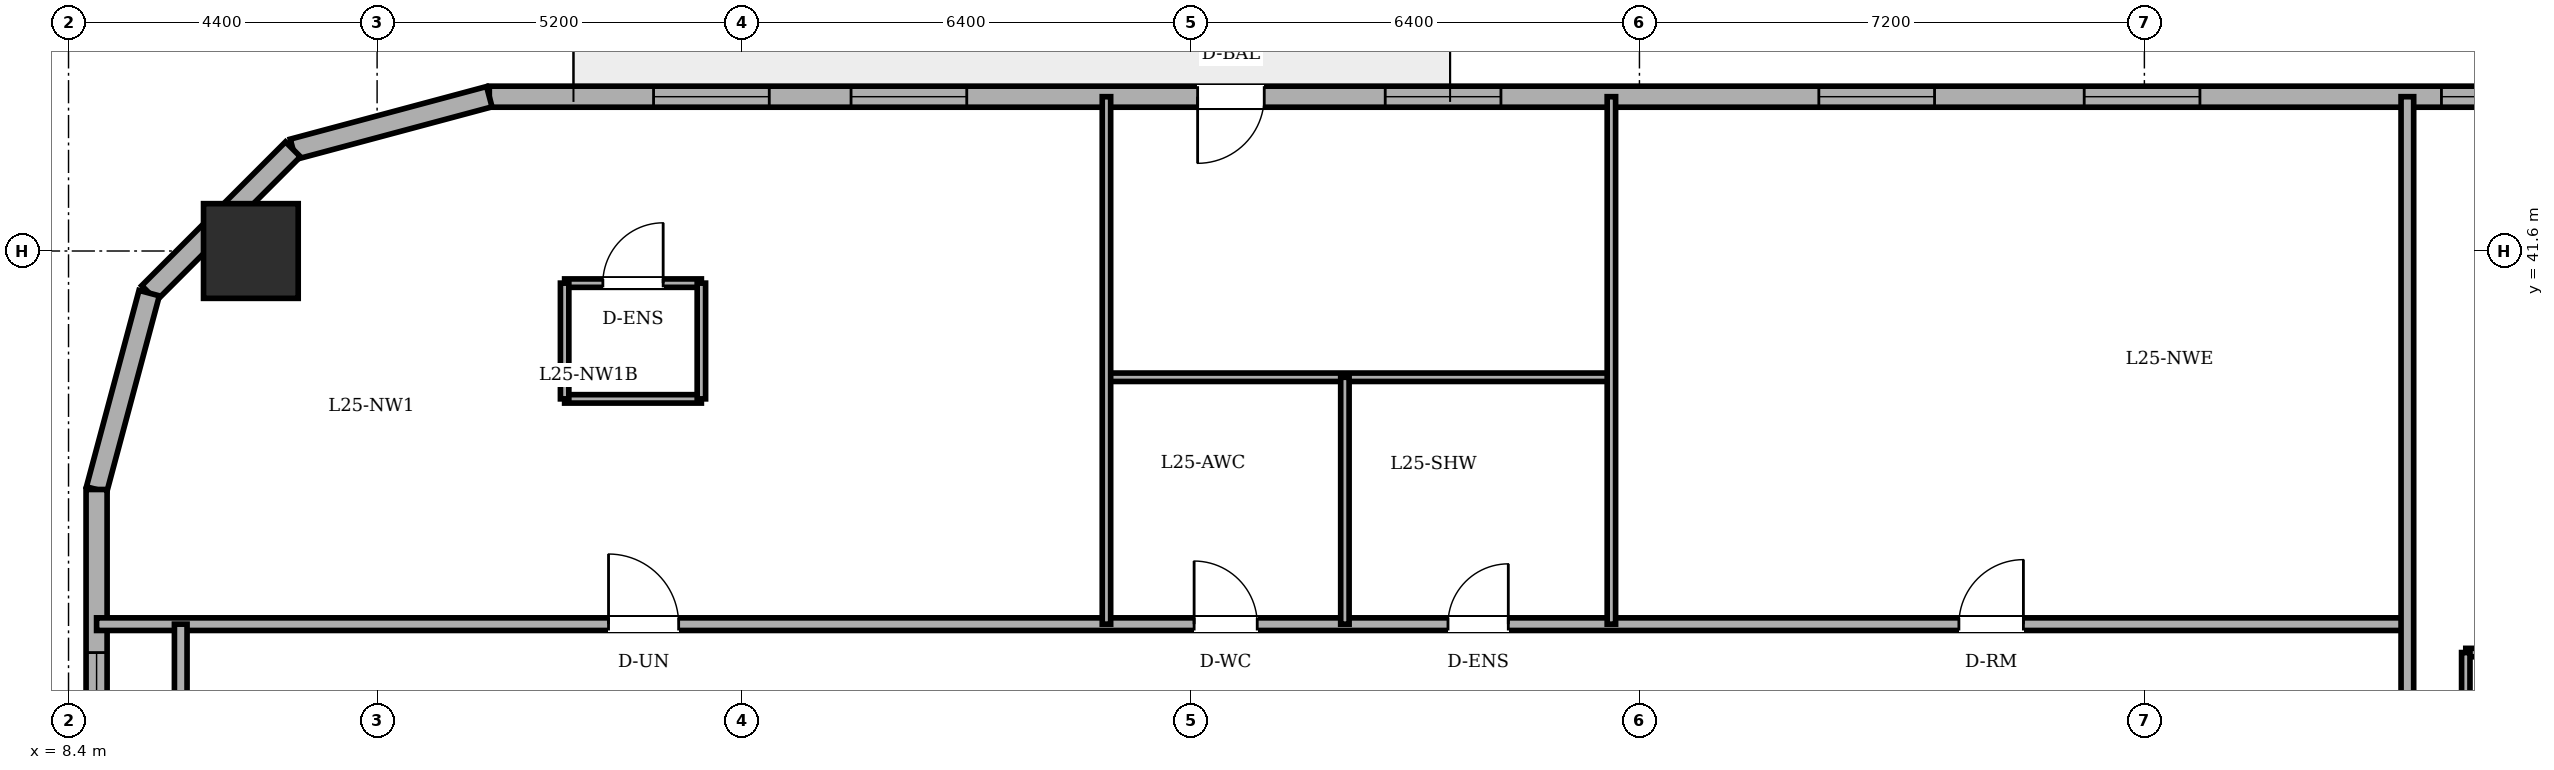
"""IFC4 building model, lengths in metres.
Left out: names, types, materials, properties, quantities, classifications, styles, units other than length and angle.
Written with IfcOpenShell. Run it as: python <this file> out.ifc"""

import sys

from ifc_helpers import new_model, si_unit, direction, frame, frame_2d, origin, origin_2d, place, context, subcontext, project, spatial, rectangle, circle, extrude, element, fill, save


model = new_model("IFC4")
c1 = context("Model", 3, precision=1e-05, world=origin(), true_north=direction((0.0, 1.0)))
c2 = subcontext(c1, "Body", "Model", "MODEL_VIEW")
j1 = project(units=[si_unit("LENGTHUNIT", "METRE"), si_unit("PLANEANGLEUNIT", "RADIAN")], contexts=[c1])
p1 = place(None, origin())
s1 = spatial("IfcSite", under=j1, at=p1, CompositionType="ELEMENT")
p2 = place(p1, origin())
s2 = spatial("IfcBuilding", under=s1, at=p2, CompositionType="ELEMENT")
p3 = place(p2, frame((0.0, 0.0, 97.1)))
s3 = spatial("IfcBuildingStorey", under=s2, at=p3, CompositionType="ELEMENT", Elevation=97.1)
p4 = place(p3, frame((11.0, 41.6, 0.0), z_axis=(0.0, 0.0, 1.0), x_axis=(1.0, 0.0, 0.0)))
e1 = element("IfcColumn", 1, at=p4, inside=s3, PredefinedType="COLUMN", context=c2, shape_type="SweptSolid", body=[
    extrude(circle(Radius=0.675, at=origin_2d()), origin(), (0.0, 0.0, 1.0), 3.6),
])
p5 = place(p3, frame((44.333, 43.8, 0.0), z_axis=(0.0, 0.0, 1.0), x_axis=(-1.0, 0.0, 0.0)))
e2 = element("IfcWall", 2, at=p5, inside=s3, PredefinedType="SOLIDWALL", context=c2, shape_type="SweptSolid", body=[
    extrude(rectangle(XDim=29.933, YDim=0.3, at=frame_2d((14.967, 0.0))), origin(), (0.0, 0.0, 1.0), 3.4),
])
p6 = place(p5, frame((18.883, 0.0, 0.0)))
e3 = element("IfcOpeningElement", 3, at=p6, cuts=e2, PredefinedType="OPENING", context=c2, shape_type="SweptSolid", body=[
    extrude(rectangle(XDim=0.95, YDim=2.2, at=frame_2d((0.475, 1.1))), frame((0.0, 0.16, 0.0), z_axis=(0.0, -1.0, 0.0), x_axis=(1.0, 0.0, 0.0)), (0.0, 0.0, 1.0), 0.32),
])
p7 = place(p5, frame((5.541, 0.0, 0.85)))
e4 = element("IfcOpeningElement", 4, at=p7, cuts=e2, PredefinedType="OPENING", context=c2, shape_type="SweptSolid", body=[
    extrude(rectangle(XDim=1.65, YDim=1.55, at=frame_2d((0.825, 0.775))), frame((0.0, 0.16, 0.0), z_axis=(0.0, -1.0, 0.0), x_axis=(1.0, 0.0, 0.0)), (0.0, 0.0, 1.0), 0.32),
])
p8 = place(p5, frame((9.325, 0.0, 0.85)))
e5 = element("IfcOpeningElement", 5, at=p8, cuts=e2, PredefinedType="OPENING", context=c2, shape_type="SweptSolid", body=[
    extrude(rectangle(XDim=1.65, YDim=1.55, at=frame_2d((0.825, 0.775))), frame((0.0, 0.16, 0.0), z_axis=(0.0, -1.0, 0.0), x_axis=(1.0, 0.0, 0.0)), (0.0, 0.0, 1.0), 0.32),
])
p9 = place(p5, frame((15.508, 0.0, 0.85)))
e6 = element("IfcOpeningElement", 6, at=p9, cuts=e2, PredefinedType="OPENING", context=c2, shape_type="SweptSolid", body=[
    extrude(rectangle(XDim=1.65, YDim=1.55, at=frame_2d((0.825, 0.775))), frame((0.0, 0.16, 0.0), z_axis=(0.0, -1.0, 0.0), x_axis=(1.0, 0.0, 0.0)), (0.0, 0.0, 1.0), 0.32),
])
p10 = place(p5, frame((23.125, 0.0, 0.85)))
e7 = element("IfcOpeningElement", 7, at=p10, cuts=e2, PredefinedType="OPENING", context=c2, shape_type="SweptSolid", body=[
    extrude(rectangle(XDim=1.65, YDim=1.55, at=frame_2d((0.825, 0.775))), frame((0.0, 0.16, 0.0), z_axis=(0.0, -1.0, 0.0), x_axis=(1.0, 0.0, 0.0)), (0.0, 0.0, 1.0), 0.32),
])
p11 = place(p5, frame((25.941, 0.0, 0.85)))
e8 = element("IfcOpeningElement", 8, at=p11, cuts=e2, PredefinedType="OPENING", context=c2, shape_type="SweptSolid", body=[
    extrude(rectangle(XDim=1.65, YDim=1.55, at=frame_2d((0.825, 0.775))), frame((0.0, 0.16, 0.0), z_axis=(0.0, -1.0, 0.0), x_axis=(1.0, 0.0, 0.0)), (0.0, 0.0, 1.0), 0.32),
])
p12 = place(p5, frame((1.047, 0.0, 0.85)))
e9 = element("IfcOpeningElement", 9, at=p12, cuts=e2, PredefinedType="OPENING", context=c2, shape_type="SweptSolid", body=[
    extrude(rectangle(XDim=1.05, YDim=1.55, at=frame_2d((0.525, 0.775))), frame((0.0, 0.16, 0.0), z_axis=(0.0, -1.0, 0.0), x_axis=(1.0, 0.0, 0.0)), (0.0, 0.0, 1.0), 0.32),
])
p13 = place(p3, frame((14.4, 43.8, 0.0), z_axis=(0.0, 0.0, 1.0), x_axis=(-0.965943540406, -0.258752926066, 0.0)))
e10 = element("IfcWall", 10, at=p13, inside=s3, PredefinedType="SOLIDWALL", context=c2, shape_type="SweptSolid", body=[
    extrude(rectangle(XDim=2.898, YDim=0.3, at=frame_2d((1.449, 0.0))), origin(), (0.0, 0.0, 1.0), 3.4),
])
p14 = place(p3, frame((11.6, 43.05, 0.0), z_axis=(0.0, 0.0, 1.0), x_axis=(-0.707106781187, -0.707106781187, 0.0)))
e11 = element("IfcWall", 11, at=p14, inside=s3, PredefinedType="SOLIDWALL", context=c2, shape_type="SweptSolid", body=[
    extrude(rectangle(XDim=2.899, YDim=0.3, at=frame_2d((1.45, 0.0))), origin(), (0.0, 0.0, 1.0), 3.4),
])
p15 = place(p3, frame((9.55, 41.0, 0.0), z_axis=(0.0, 0.0, 1.0), x_axis=(-0.258731875344, -0.96594917914, 0.0)))
e12 = element("IfcWall", 12, at=p15, inside=s3, PredefinedType="SOLIDWALL", context=c2, shape_type="SweptSolid", body=[
    extrude(rectangle(XDim=2.899, YDim=0.3, at=frame_2d((1.449, 0.0))), origin(), (0.0, 0.0, 1.0), 3.4),
])
p16 = place(p3, frame((8.8, 38.2, 0.0), z_axis=(0.0, 0.0, 1.0), x_axis=(0.0, -1.0, 0.0)))
e13 = element("IfcWall", 13, at=p16, inside=s3, PredefinedType="SOLIDWALL", context=c2, shape_type="SweptSolid", body=[
    extrude(rectangle(XDim=28.4, YDim=0.3, at=frame_2d((14.2, 0.0))), origin(), (0.0, 0.0, 1.0), 3.4),
])
p17 = place(p16, frame((2.325, 0.0, 0.85)))
e14 = element("IfcOpeningElement", 14, at=p17, cuts=e13, PredefinedType="OPENING", context=c2, shape_type="SweptSolid", body=[
    extrude(rectangle(XDim=1.65, YDim=1.55, at=frame_2d((0.825, 0.775))), frame((0.0, 0.16, 0.0), z_axis=(0.0, -1.0, 0.0), x_axis=(1.0, 0.0, 0.0)), (0.0, 0.0, 1.0), 0.32),
])
p18 = place(p16, frame((7.328, 0.0, 0.85)))
e15 = element("IfcOpeningElement", 15, at=p18, cuts=e13, PredefinedType="OPENING", context=c2, shape_type="SweptSolid", body=[
    extrude(rectangle(XDim=1.65, YDim=1.55, at=frame_2d((0.825, 0.775))), frame((0.0, 0.16, 0.0), z_axis=(0.0, -1.0, 0.0), x_axis=(1.0, 0.0, 0.0)), (0.0, 0.0, 1.0), 0.32),
])
p19 = place(p16, frame((11.102, 0.0, 0.85)))
e16 = element("IfcOpeningElement", 16, at=p19, cuts=e13, PredefinedType="OPENING", context=c2, shape_type="SweptSolid", body=[
    extrude(rectangle(XDim=1.65, YDim=1.55, at=frame_2d((0.825, 0.775))), frame((0.0, 0.16, 0.0), z_axis=(0.0, -1.0, 0.0), x_axis=(1.0, 0.0, 0.0)), (0.0, 0.0, 1.0), 0.32),
])
p20 = place(p16, frame((17.648, 0.0, 0.85)))
e17 = element("IfcOpeningElement", 17, at=p20, cuts=e13, PredefinedType="OPENING", context=c2, shape_type="SweptSolid", body=[
    extrude(rectangle(XDim=1.65, YDim=1.55, at=frame_2d((0.825, 0.775))), frame((0.0, 0.16, 0.0), z_axis=(0.0, -1.0, 0.0), x_axis=(1.0, 0.0, 0.0)), (0.0, 0.0, 1.0), 0.32),
])
p21 = place(p16, frame((20.422, 0.0, 0.85)))
e18 = element("IfcOpeningElement", 18, at=p21, cuts=e13, PredefinedType="OPENING", context=c2, shape_type="SweptSolid", body=[
    extrude(rectangle(XDim=1.65, YDim=1.55, at=frame_2d((0.825, 0.775))), frame((0.0, 0.16, 0.0), z_axis=(0.0, -1.0, 0.0), x_axis=(1.0, 0.0, 0.0)), (0.0, 0.0, 1.0), 0.32),
])
p22 = place(p16, frame((24.425, 0.0, 0.85)))
e19 = element("IfcOpeningElement", 19, at=p22, cuts=e13, PredefinedType="OPENING", context=c2, shape_type="SweptSolid", body=[
    extrude(rectangle(XDim=1.65, YDim=1.55, at=frame_2d((0.825, 0.775))), frame((0.0, 0.16, 0.0), z_axis=(0.0, -1.0, 0.0), x_axis=(1.0, 0.0, 0.0)), (0.0, 0.0, 1.0), 0.32),
])
p23 = place(p3, frame((42.583, 35.875, 0.0), z_axis=(0.0, 0.0, 1.0), x_axis=(1.0, 0.0, 0.0)))
e20 = element("IfcWall", 20, at=p23, inside=s3, PredefinedType="PARTITIONING", context=c2, shape_type="SweptSolid", body=[
    extrude(rectangle(XDim=1.95, YDim=0.12, at=frame_2d((0.975, 0.0))), origin(), (0.0, 0.0, 1.0), 3.4),
])
p24 = place(p23, frame((0.545, 0.0, 0.0)))
e21 = element("IfcOpeningElement", 21, at=p24, cuts=e20, PredefinedType="OPENING", context=c2, shape_type="SweptSolid", body=[
    extrude(rectangle(XDim=0.86, YDim=2.1, at=frame_2d((0.43, 1.05))), frame((0.0, 0.07, 0.0), z_axis=(0.0, -1.0, 0.0), x_axis=(1.0, 0.0, 0.0)), (0.0, 0.0, 1.0), 0.14),
])
p25 = place(p3, frame((42.583, 35.875, 0.0), z_axis=(0.0, 0.0, 1.0), x_axis=(0.0, -1.0, 0.0)))
e22 = element("IfcWall", 22, at=p25, inside=s3, PredefinedType="PARTITIONING", context=c2, shape_type="SweptSolid", body=[
    extrude(rectangle(XDim=1.65, YDim=0.12, at=frame_2d((0.825, 0.0))), origin(), (0.0, 0.0, 1.0), 3.4),
])
p26 = place(p3, frame((15.474, 41.142, 0.0), z_axis=(0.0, 0.0, 1.0), x_axis=(1.0, 0.0, 0.0)))
e23 = element("IfcWall", 23, at=p26, inside=s3, PredefinedType="PARTITIONING", context=c2, shape_type="SweptSolid", body=[
    extrude(rectangle(XDim=1.95, YDim=0.12, at=frame_2d((0.975, 0.0))), origin(), (0.0, 0.0, 1.0), 3.4),
])
p27 = place(p26, frame((0.545, 0.0, 0.0)))
e24 = element("IfcOpeningElement", 24, at=p27, cuts=e23, PredefinedType="OPENING", context=c2, shape_type="SweptSolid", body=[
    extrude(rectangle(XDim=0.86, YDim=2.1, at=frame_2d((0.43, 1.05))), frame((0.0, 0.07, 0.0), z_axis=(0.0, -1.0, 0.0), x_axis=(1.0, 0.0, 0.0)), (0.0, 0.0, 1.0), 0.14),
])
p28 = place(p3, frame((17.424, 39.492, 0.0), z_axis=(0.0, 0.0, 1.0), x_axis=(-1.0, 0.0, 0.0)))
e25 = element("IfcWall", 25, at=p28, inside=s3, PredefinedType="PARTITIONING", context=c2, shape_type="SweptSolid", body=[
    extrude(rectangle(XDim=1.95, YDim=0.12, at=frame_2d((0.975, 0.0))), origin(), (0.0, 0.0, 1.0), 3.4),
])
for number, where, z_axis, x_axis in (
    (26, (15.474, 41.142, 0.0), (0.0, 0.0, 1.0), (0.0, -1.0, 0.0)),
    (27, (17.424, 39.492, 0.0), (0.0, 0.0, 1.0), (0.0, 1.0, 0.0)),
):
    element("IfcWall", number, at=place(p3, frame(where, z_axis=z_axis, x_axis=x_axis)), inside=s3, PredefinedType="PARTITIONING", context=c2, shape_type="SweptSolid", body=[
        extrude(rectangle(XDim=1.65, YDim=0.12, at=frame_2d((0.825, 0.0))), origin(), (0.0, 0.0, 1.0), 3.4),
    ])
p29 = place(p3, frame((8.8, 36.28, 0.0), z_axis=(0.0, 0.0, 1.0), x_axis=(1.0, 0.0, 0.0)))
e28 = element("IfcWall", 28, at=p29, inside=s3, PredefinedType="PARTITIONING", context=c2, shape_type="SweptSolid", body=[
    extrude(rectangle(XDim=32.95, YDim=0.18, at=frame_2d((16.475, 0.0))), origin(), (0.0, 0.0, 1.0), 3.4),
])
p30 = place(p29, frame((15.65, 0.0, 0.0)))
e29 = element("IfcOpeningElement", 29, at=p30, cuts=e28, PredefinedType="OPENING", context=c2, shape_type="SweptSolid", body=[
    extrude(rectangle(XDim=0.9, YDim=2.1, at=frame_2d((0.45, 1.05))), frame((0.0, 0.1, 0.0), z_axis=(0.0, -1.0, 0.0), x_axis=(1.0, 0.0, 0.0)), (0.0, 0.0, 1.0), 0.2),
])
p31 = place(p29, frame((19.27, 0.0, 0.0)))
e30 = element("IfcOpeningElement", 30, at=p31, cuts=e28, PredefinedType="OPENING", context=c2, shape_type="SweptSolid", body=[
    extrude(rectangle(XDim=0.86, YDim=2.1, at=frame_2d((0.43, 1.05))), frame((0.0, 0.1, 0.0), z_axis=(0.0, -1.0, 0.0), x_axis=(1.0, 0.0, 0.0)), (0.0, 0.0, 1.0), 0.2),
])
p32 = place(p29, frame((7.3, 0.0, 0.0)))
e31 = element("IfcOpeningElement", 31, at=p32, cuts=e28, PredefinedType="OPENING", context=c2, shape_type="SweptSolid", body=[
    extrude(rectangle(XDim=1.0, YDim=2.15, at=frame_2d((0.5, 1.075))), frame((0.0, 0.1, 0.0), z_axis=(0.0, -1.0, 0.0), x_axis=(1.0, 0.0, 0.0)), (0.0, 0.0, 1.0), 0.2),
])
p33 = place(p29, frame((26.555, 0.0, 0.0)))
e32 = element("IfcOpeningElement", 32, at=p33, cuts=e28, PredefinedType="OPENING", context=c2, shape_type="SweptSolid", body=[
    extrude(rectangle(XDim=0.92, YDim=2.1, at=frame_2d((0.46, 1.05))), frame((0.0, 0.1, 0.0), z_axis=(0.0, -1.0, 0.0), x_axis=(1.0, 0.0, 0.0)), (0.0, 0.0, 1.0), 0.2),
])
p34 = place(p3, frame((23.2, 39.8, 0.0), z_axis=(0.0, 0.0, 1.0), x_axis=(1.0, 0.0, 0.0)))
e33 = element("IfcWall", 33, at=p34, inside=s3, PredefinedType="PARTITIONING", context=c2, shape_type="SweptSolid", body=[
    extrude(rectangle(XDim=7.2, YDim=0.12, at=frame_2d((3.6, 0.0))), origin(), (0.0, 0.0, 1.0), 3.4),
])
p35 = place(p3, frame((10.0, 33.82, 0.0), z_axis=(0.0, 0.0, 1.0), x_axis=(0.0, 1.0, 0.0)))
e34 = element("IfcWall", 34, at=p35, inside=s3, PredefinedType="PARTITIONING", context=c2, shape_type="SweptSolid", body=[
    extrude(rectangle(XDim=2.46, YDim=0.18, at=frame_2d((1.23, 0.0))), origin(), (0.0, 0.0, 1.0), 3.4),
])
p36 = place(p3, frame((23.2, 36.28, 0.0), z_axis=(0.0, 0.0, 1.0), x_axis=(0.0, 1.0, 0.0)))
e35 = element("IfcWall", 35, at=p36, inside=s3, PredefinedType="PARTITIONING", context=c2, shape_type="SweptSolid", body=[
    extrude(rectangle(XDim=7.52, YDim=0.12, at=frame_2d((3.76, 0.0))), origin(), (0.0, 0.0, 1.0), 3.4),
])
p37 = place(p3, frame((26.6, 36.28, 0.0), z_axis=(0.0, 0.0, 1.0), x_axis=(0.0, 1.0, 0.0)))
e36 = element("IfcWall", 36, at=p37, inside=s3, PredefinedType="PARTITIONING", context=c2, shape_type="SweptSolid", body=[
    extrude(rectangle(XDim=3.52, YDim=0.12, at=frame_2d((1.76, 0.0))), origin(), (0.0, 0.0, 1.0), 3.4),
])
p38 = place(p3, frame((30.4, 36.28, 0.0), z_axis=(0.0, 0.0, 1.0), x_axis=(0.0, 1.0, 0.0)))
e37 = element("IfcWall", 37, at=p38, inside=s3, PredefinedType="PARTITIONING", context=c2, shape_type="SweptSolid", body=[
    extrude(rectangle(XDim=7.52, YDim=0.12, at=frame_2d((3.76, 0.0))), origin(), (0.0, 0.0, 1.0), 3.4),
])
p39 = place(p3, frame((41.75, 25.18, 0.0), z_axis=(0.0, 0.0, 1.0), x_axis=(0.0, 1.0, 0.0)))
e38 = element("IfcWall", 38, at=p39, inside=s3, PredefinedType="PARTITIONING", context=c2, shape_type="SweptSolid", body=[
    extrude(rectangle(XDim=18.62, YDim=0.18, at=frame_2d((9.31, 0.0))), origin(), (0.0, 0.0, 1.0), 3.4),
])
p40 = place(p39, frame((5.31, 0.0, 0.0)))
e39 = element("IfcOpeningElement", 39, at=p40, cuts=e38, PredefinedType="OPENING", context=c2, shape_type="SweptSolid", body=[
    extrude(rectangle(XDim=1.0, YDim=2.15, at=frame_2d((0.5, 1.075))), frame((0.0, 0.1, 0.0), z_axis=(0.0, -1.0, 0.0), x_axis=(1.0, 0.0, 0.0)), (0.0, 0.0, 1.0), 0.2),
])
p41 = place(p6, origin())
e40 = element("IfcDoor", 40, at=p41, inside=s3, OperationType="SINGLE_SWING_RIGHT", PredefinedType="DOOR", context=c2, shape_type="SweptSolid", body=[
    extrude(rectangle(XDim=0.95, YDim=2.2, at=frame_2d((0.475, 1.1))), frame((0.0, 0.025, 0.0), z_axis=(0.0, -1.0, 0.0), x_axis=(1.0, 0.0, 0.0)), (0.0, 0.0, 1.0), 0.05),
])
fill(e3, e40)
p42 = place(p7, origin())
e41 = element("IfcWindow", 41, at=p42, inside=s3, PartitioningType="DOUBLE_PANEL_VERTICAL", PredefinedType="WINDOW", context=c2, shape_type="SweptSolid", body=[
    extrude(rectangle(XDim=1.65, YDim=1.55, at=frame_2d((0.825, 0.775))), frame((0.0, 0.03, 0.0), z_axis=(0.0, -1.0, 0.0), x_axis=(1.0, 0.0, 0.0)), (0.0, 0.0, 1.0), 0.06),
])
fill(e4, e41)
p43 = place(p8, origin())
e42 = element("IfcWindow", 42, at=p43, inside=s3, PartitioningType="DOUBLE_PANEL_VERTICAL", PredefinedType="WINDOW", context=c2, shape_type="SweptSolid", body=[
    extrude(rectangle(XDim=1.65, YDim=1.55, at=frame_2d((0.825, 0.775))), frame((0.0, 0.03, 0.0), z_axis=(0.0, -1.0, 0.0), x_axis=(1.0, 0.0, 0.0)), (0.0, 0.0, 1.0), 0.06),
])
fill(e5, e42)
p44 = place(p9, origin())
e43 = element("IfcWindow", 43, at=p44, inside=s3, PartitioningType="DOUBLE_PANEL_VERTICAL", PredefinedType="WINDOW", context=c2, shape_type="SweptSolid", body=[
    extrude(rectangle(XDim=1.65, YDim=1.55, at=frame_2d((0.825, 0.775))), frame((0.0, 0.03, 0.0), z_axis=(0.0, -1.0, 0.0), x_axis=(1.0, 0.0, 0.0)), (0.0, 0.0, 1.0), 0.06),
])
fill(e6, e43)
p45 = place(p10, origin())
e44 = element("IfcWindow", 44, at=p45, inside=s3, PartitioningType="DOUBLE_PANEL_VERTICAL", PredefinedType="WINDOW", context=c2, shape_type="SweptSolid", body=[
    extrude(rectangle(XDim=1.65, YDim=1.55, at=frame_2d((0.825, 0.775))), frame((0.0, 0.03, 0.0), z_axis=(0.0, -1.0, 0.0), x_axis=(1.0, 0.0, 0.0)), (0.0, 0.0, 1.0), 0.06),
])
fill(e7, e44)
p46 = place(p11, origin())
e45 = element("IfcWindow", 45, at=p46, inside=s3, PartitioningType="DOUBLE_PANEL_VERTICAL", PredefinedType="WINDOW", context=c2, shape_type="SweptSolid", body=[
    extrude(rectangle(XDim=1.65, YDim=1.55, at=frame_2d((0.825, 0.775))), frame((0.0, 0.03, 0.0), z_axis=(0.0, -1.0, 0.0), x_axis=(1.0, 0.0, 0.0)), (0.0, 0.0, 1.0), 0.06),
])
fill(e8, e45)
p47 = place(p17, origin())
e46 = element("IfcWindow", 46, at=p47, inside=s3, PartitioningType="DOUBLE_PANEL_VERTICAL", PredefinedType="WINDOW", context=c2, shape_type="SweptSolid", body=[
    extrude(rectangle(XDim=1.65, YDim=1.55, at=frame_2d((0.825, 0.775))), frame((0.0, 0.03, 0.0), z_axis=(0.0, -1.0, 0.0), x_axis=(1.0, 0.0, 0.0)), (0.0, 0.0, 1.0), 0.06),
])
fill(e14, e46)
p48 = place(p12, origin())
e47 = element("IfcWindow", 47, at=p48, inside=s3, PartitioningType="SINGLE_PANEL", PredefinedType="WINDOW", context=c2, shape_type="SweptSolid", body=[
    extrude(rectangle(XDim=1.05, YDim=1.55, at=frame_2d((0.525, 0.775))), frame((0.0, 0.03, 0.0), z_axis=(0.0, -1.0, 0.0), x_axis=(1.0, 0.0, 0.0)), (0.0, 0.0, 1.0), 0.06),
])
fill(e9, e47)
p49 = place(p27, origin())
e48 = element("IfcDoor", 48, at=p49, inside=s3, OperationType="SINGLE_SWING_RIGHT", PredefinedType="DOOR", context=c2, shape_type="SweptSolid", body=[
    extrude(rectangle(XDim=0.86, YDim=2.1, at=frame_2d((0.43, 1.05))), frame((0.0, 0.025, 0.0), z_axis=(0.0, -1.0, 0.0), x_axis=(1.0, 0.0, 0.0)), (0.0, 0.0, 1.0), 0.05),
])
fill(e24, e48)
p50 = place(p30, origin())
e49 = element("IfcDoor", 49, at=p50, inside=s3, OperationType="SINGLE_SWING_LEFT", PredefinedType="DOOR", context=c2, shape_type="SweptSolid", body=[
    extrude(rectangle(XDim=0.9, YDim=2.1, at=frame_2d((0.45, 1.05))), frame((0.0, 0.025, 0.0), z_axis=(0.0, -1.0, 0.0), x_axis=(1.0, 0.0, 0.0)), (0.0, 0.0, 1.0), 0.05),
])
fill(e29, e49)
p51 = place(p31, origin())
e50 = element("IfcDoor", 50, at=p51, inside=s3, OperationType="SINGLE_SWING_RIGHT", PredefinedType="DOOR", context=c2, shape_type="SweptSolid", body=[
    extrude(rectangle(XDim=0.86, YDim=2.1, at=frame_2d((0.43, 1.05))), frame((0.0, 0.025, 0.0), z_axis=(0.0, -1.0, 0.0), x_axis=(1.0, 0.0, 0.0)), (0.0, 0.0, 1.0), 0.05),
])
fill(e30, e50)
p52 = place(p32, origin())
e51 = element("IfcDoor", 51, at=p52, inside=s3, OperationType="SINGLE_SWING_LEFT", PredefinedType="DOOR", context=c2, shape_type="SweptSolid", body=[
    extrude(rectangle(XDim=1.0, YDim=2.15, at=frame_2d((0.5, 1.075))), frame((0.0, 0.025, 0.0), z_axis=(0.0, -1.0, 0.0), x_axis=(1.0, 0.0, 0.0)), (0.0, 0.0, 1.0), 0.05),
])
fill(e31, e51)
p53 = place(p33, origin())
e52 = element("IfcDoor", 52, at=p53, inside=s3, OperationType="SINGLE_SWING_RIGHT", PredefinedType="DOOR", context=c2, shape_type="SweptSolid", body=[
    extrude(rectangle(XDim=0.92, YDim=2.1, at=frame_2d((0.46, 1.05))), frame((0.0, 0.025, 0.0), z_axis=(0.0, -1.0, 0.0), x_axis=(1.0, 0.0, 0.0)), (0.0, 0.0, 1.0), 0.05),
])
fill(e32, e52)
save(model, sys.argv[1])
